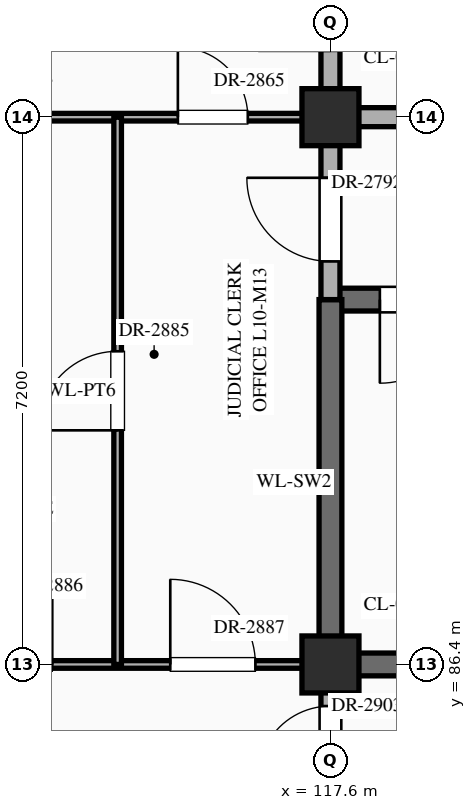
"""IFC4 building model, lengths in metres.
Left out: names, types, materials, properties, quantities, classifications, styles, units other than length and angle.
Written with IfcOpenShell. Run it as: python <this file> out.ifc"""

import sys

from ifc_helpers import new_model, si_unit, direction, frame, frame_2d, origin, origin_2d, place, context, subcontext, project, spatial, rectangle, extrude, element, fill, save


model = new_model("IFC4")
c1 = context("Model", 3, precision=1e-05, world=origin(), true_north=direction((0.0, 1.0)))
c2 = subcontext(c1, "Body", "Model", "MODEL_VIEW")
j1 = project(units=[si_unit("LENGTHUNIT", "METRE"), si_unit("PLANEANGLEUNIT", "RADIAN")], contexts=[c1])
p1 = place(None, origin())
s1 = spatial("IfcSite", under=j1, at=p1, CompositionType="ELEMENT")
p2 = place(p1, origin())
s2 = spatial("IfcBuilding", under=s1, at=p2, CompositionType="ELEMENT")
p3 = place(p2, frame((0.0, 0.0, 43.5)))
s3 = spatial("IfcBuildingStorey", under=s2, at=p3, CompositionType="ELEMENT", Elevation=43.5)
for number, where, z_axis, x_axis in (
    (1, (117.6, 86.4, 0.0), (0.0, 0.0, 1.0), (1.0, 0.0, 0.0)),
    (2, (117.6, 93.6, 0.0), (0.0, 0.0, 1.0), (1.0, 0.0, 0.0)),
):
    element("IfcColumn", number, at=place(p3, frame(where, z_axis=z_axis, x_axis=x_axis)), inside=s3, PredefinedType="COLUMN", context=c2, shape_type="SweptSolid", body=[
        extrude(rectangle(XDim=0.75, YDim=0.75, at=origin_2d()), origin(), (0.0, 0.0, 1.0), 4.2),
    ])
p4 = place(p3, frame((109.2, 86.4, 0.0), z_axis=(0.0, 0.0, 1.0), x_axis=(1.0, 0.0, 0.0)))
e3 = element("IfcWall", 3, at=p4, inside=s3, PredefinedType="STANDARD", context=c2, shape_type="SweptSolid", body=[
    extrude(rectangle(XDim=8.4, YDim=0.1, at=frame_2d((4.2, 0.0))), origin(), (0.0, 0.0, 1.0), 3.1),
])
p5 = place(p4, frame((1.048, 0.0, 0.0)))
e4 = element("IfcOpeningElement", 4, at=p5, cuts=e3, PredefinedType="OPENING", context=c2, shape_type="SweptSolid", body=[
    extrude(rectangle(XDim=1.0, YDim=2.25, at=frame_2d((0.5, 1.125))), frame((0.0, 0.062, 0.0), z_axis=(0.0, -1.0, 0.0), x_axis=(1.0, 0.0, 0.0)), (0.0, 0.0, 1.0), 0.124),
])
p6 = place(p4, frame((3.66, 0.0, 0.0)))
e5 = element("IfcOpeningElement", 5, at=p6, cuts=e3, PredefinedType="OPENING", context=c2, shape_type="SweptSolid", body=[
    extrude(rectangle(XDim=1.08, YDim=2.25, at=frame_2d((0.54, 1.125))), frame((0.0, 0.062, 0.0), z_axis=(0.0, -1.0, 0.0), x_axis=(1.0, 0.0, 0.0)), (0.0, 0.0, 1.0), 0.124),
])
p7 = place(p4, frame((6.292, 0.0, 0.0)))
e6 = element("IfcOpeningElement", 6, at=p7, cuts=e3, PredefinedType="OPENING", context=c2, shape_type="SweptSolid", body=[
    extrude(rectangle(XDim=1.12, YDim=2.25, at=frame_2d((0.56, 1.125))), frame((0.0, 0.062, 0.0), z_axis=(0.0, -1.0, 0.0), x_axis=(1.0, 0.0, 0.0)), (0.0, 0.0, 1.0), 0.124),
])
p8 = place(p3, frame((117.6, 86.4, 0.0), z_axis=(0.0, 0.0, 1.0), x_axis=(1.0, 0.0, 0.0)))
e7 = element("IfcWall", 7, at=p8, inside=s3, PredefinedType="SHEAR", context=c2, shape_type="SweptSolid", body=[
    extrude(rectangle(XDim=8.36, YDim=0.3, at=frame_2d((4.18, 0.0))), origin(), (0.0, 0.0, 1.0), 4.0),
])
p9 = place(p3, frame((117.6, 91.2, 0.0), z_axis=(0.0, 0.0, 1.0), x_axis=(1.0, 0.0, 0.0)))
e8 = element("IfcWall", 8, at=p9, inside=s3, PredefinedType="SHEAR", context=c2, shape_type="SweptSolid", body=[
    extrude(rectangle(XDim=8.36, YDim=0.3, at=frame_2d((4.18, 0.0))), origin(), (0.0, 0.0, 1.0), 4.0),
])
p10 = place(p9, frame((0.65, 0.0, 0.0)))
e9 = element("IfcOpeningElement", 9, at=p10, cuts=e8, PredefinedType="OPENING", context=c2, shape_type="SweptSolid", body=[
    extrude(rectangle(XDim=1.1, YDim=2.2, at=frame_2d((0.55, 1.1))), frame((0.0, 0.162, 0.0), z_axis=(0.0, -1.0, 0.0), x_axis=(1.0, 0.0, 0.0)), (0.0, 0.0, 1.0), 0.324),
])
p11 = place(p3, frame((109.2, 93.6, 0.0), z_axis=(0.0, 0.0, 1.0), x_axis=(1.0, 0.0, 0.0)))
e10 = element("IfcWall", 10, at=p11, inside=s3, PredefinedType="STANDARD", context=c2, shape_type="SweptSolid", body=[
    extrude(rectangle(XDim=8.4, YDim=0.1, at=frame_2d((4.2, 0.0))), origin(), (0.0, 0.0, 1.0), 3.1),
])
p12 = place(p11, frame((1.097, 0.0, 0.0)))
e11 = element("IfcOpeningElement", 11, at=p12, cuts=e10, PredefinedType="OPENING", context=c2, shape_type="SweptSolid", body=[
    extrude(rectangle(XDim=0.9, YDim=2.15, at=frame_2d((0.45, 1.075))), frame((0.0, 0.062, 0.0), z_axis=(0.0, -1.0, 0.0), x_axis=(1.0, 0.0, 0.0)), (0.0, 0.0, 1.0), 0.124),
])
p13 = place(p11, frame((3.77, 0.0, 0.0)))
e12 = element("IfcOpeningElement", 12, at=p13, cuts=e10, PredefinedType="OPENING", context=c2, shape_type="SweptSolid", body=[
    extrude(rectangle(XDim=0.86, YDim=2.1, at=frame_2d((0.43, 1.05))), frame((0.0, 0.062, 0.0), z_axis=(0.0, -1.0, 0.0), x_axis=(1.0, 0.0, 0.0)), (0.0, 0.0, 1.0), 0.124),
])
p14 = place(p11, frame((6.393, 0.0, 0.0)))
e13 = element("IfcOpeningElement", 13, at=p14, cuts=e10, PredefinedType="OPENING", context=c2, shape_type="SweptSolid", body=[
    extrude(rectangle(XDim=0.92, YDim=2.15, at=frame_2d((0.46, 1.075))), frame((0.0, 0.062, 0.0), z_axis=(0.0, -1.0, 0.0), x_axis=(1.0, 0.0, 0.0)), (0.0, 0.0, 1.0), 0.124),
])
p15 = place(p3, frame((117.6, 93.6, 0.0), z_axis=(0.0, 0.0, 1.0), x_axis=(1.0, 0.0, 0.0)))
e14 = element("IfcWall", 14, at=p15, inside=s3, PredefinedType="STANDARD", context=c2, shape_type="SweptSolid", body=[
    extrude(rectangle(XDim=8.36, YDim=0.25, at=frame_2d((4.18, 0.0))), origin(), (0.0, 0.0, 1.0), 3.15),
])
p16 = place(p15, frame((3.3, 0.0, 0.0)))
e15 = element("IfcOpeningElement", 15, at=p16, cuts=e14, PredefinedType="OPENING", context=c2, shape_type="SweptSolid", body=[
    extrude(rectangle(XDim=1.8, YDim=2.35, at=frame_2d((0.9, 1.175))), frame((0.0, 0.137, 0.0), z_axis=(0.0, -1.0, 0.0), x_axis=(1.0, 0.0, 0.0)), (0.0, 0.0, 1.0), 0.274),
])
p17 = place(p3, frame((114.8, 86.4, 0.0), z_axis=(0.0, 0.0, 1.0), x_axis=(0.0, 1.0, 0.0)))
e16 = element("IfcWall", 16, at=p17, inside=s3, PredefinedType="STANDARD", context=c2, shape_type="SweptSolid", body=[
    extrude(rectangle(XDim=7.2, YDim=0.1, at=frame_2d((3.6, 0.0))), origin(), (0.0, 0.0, 1.0), 3.95),
])
p18 = place(p17, frame((3.08, 0.0, 0.0)))
e17 = element("IfcOpeningElement", 17, at=p18, cuts=e16, PredefinedType="OPENING", context=c2, shape_type="SweptSolid", body=[
    extrude(rectangle(XDim=1.04, YDim=2.2, at=frame_2d((0.52, 1.1))), frame((0.0, 0.062, 0.0), z_axis=(0.0, -1.0, 0.0), x_axis=(1.0, 0.0, 0.0)), (0.0, 0.0, 1.0), 0.124),
])
p19 = place(p3, frame((117.6, 79.24, 0.0), z_axis=(0.0, 0.0, 1.0), x_axis=(0.0, 1.0, 0.0)))
e18 = element("IfcWall", 18, at=p19, inside=s3, PredefinedType="STANDARD", context=c2, shape_type="SweptSolid", body=[
    extrude(rectangle(XDim=7.16, YDim=0.25, at=frame_2d((3.58, 0.0))), origin(), (0.0, 0.0, 1.0), 3.2),
])
p20 = place(p19, frame((5.663, 0.0, 0.0)))
e19 = element("IfcOpeningElement", 19, at=p20, cuts=e18, PredefinedType="OPENING", context=c2, shape_type="SweptSolid", body=[
    extrude(rectangle(XDim=0.95, YDim=2.15, at=frame_2d((0.475, 1.075))), frame((0.0, 0.137, 0.0), z_axis=(0.0, -1.0, 0.0), x_axis=(1.0, 0.0, 0.0)), (0.0, 0.0, 1.0), 0.274),
])
p21 = place(p19, frame((2.083, 0.0, 0.0)))
e20 = element("IfcOpeningElement", 20, at=p21, cuts=e18, PredefinedType="OPENING", context=c2, shape_type="SweptSolid", body=[
    extrude(rectangle(XDim=1.5, YDim=2.25, at=frame_2d((0.75, 1.125))), frame((0.0, 0.137, 0.0), z_axis=(0.0, -1.0, 0.0), x_axis=(1.0, 0.0, 0.0)), (0.0, 0.0, 1.0), 0.274),
])
p22 = place(p3, frame((117.6, 86.4, 0.0), z_axis=(0.0, 0.0, 1.0), x_axis=(0.0, 1.0, 0.0)))
e21 = element("IfcWall", 21, at=p22, inside=s3, PredefinedType="SHEAR", context=c2, shape_type="SweptSolid", body=[
    extrude(rectangle(XDim=4.8, YDim=0.3, at=frame_2d((2.4, 0.0))), origin(), (0.0, 0.0, 1.0), 3.95),
])
p23 = place(p3, frame((117.6, 91.2, 0.0), z_axis=(0.0, 0.0, 1.0), x_axis=(0.0, 1.0, 0.0)))
e22 = element("IfcWall", 22, at=p23, inside=s3, PredefinedType="STANDARD", context=c2, shape_type="SweptSolid", body=[
    extrude(rectangle(XDim=13.2, YDim=0.25, at=frame_2d((6.6, 0.0))), origin(), (0.0, 0.0, 1.0), 3.2),
])
p24 = place(p23, frame((0.502, 0.0, 0.0)))
e23 = element("IfcOpeningElement", 23, at=p24, cuts=e22, PredefinedType="OPENING", context=c2, shape_type="SweptSolid", body=[
    extrude(rectangle(XDim=1.1, YDim=2.2, at=frame_2d((0.55, 1.1))), frame((0.0, 0.137, 0.0), z_axis=(0.0, -1.0, 0.0), x_axis=(1.0, 0.0, 0.0)), (0.0, 0.0, 1.0), 0.274),
])
p25 = place(p23, frame((10.472, 0.0, 0.0)))
e24 = element("IfcOpeningElement", 24, at=p25, cuts=e22, PredefinedType="OPENING", context=c2, shape_type="SweptSolid", body=[
    extrude(rectangle(XDim=0.95, YDim=2.15, at=frame_2d((0.475, 1.075))), frame((0.0, 0.137, 0.0), z_axis=(0.0, -1.0, 0.0), x_axis=(1.0, 0.0, 0.0)), (0.0, 0.0, 1.0), 0.274),
])
p26 = place(p23, frame((3.272, 0.0, 0.0)))
e25 = element("IfcOpeningElement", 25, at=p26, cuts=e22, PredefinedType="OPENING", context=c2, shape_type="SweptSolid", body=[
    extrude(rectangle(XDim=0.95, YDim=2.15, at=frame_2d((0.475, 1.075))), frame((0.0, 0.137, 0.0), z_axis=(0.0, -1.0, 0.0), x_axis=(1.0, 0.0, 0.0)), (0.0, 0.0, 1.0), 0.274),
])
p27 = place(p10, frame((1.1, 0.0, 0.0), z_axis=(0.0, 0.0, 1.0), x_axis=(-1.0, 0.0, 0.0)))
e26 = element("IfcDoor", 26, at=p27, inside=s3, OperationType="SINGLE_SWING_RIGHT", PredefinedType="DOOR", context=c2, shape_type="SweptSolid", body=[
    extrude(rectangle(XDim=1.1, YDim=2.2, at=frame_2d((0.55, 1.1))), frame((0.0, 0.025, 0.0), z_axis=(0.0, -1.0, 0.0), x_axis=(1.0, 0.0, 0.0)), (0.0, 0.0, 1.0), 0.05),
])
fill(e9, e26)
p28 = place(p24, origin())
e27 = element("IfcDoor", 27, at=p28, inside=s3, OperationType="SINGLE_SWING_RIGHT", PredefinedType="DOOR", context=c2, shape_type="SweptSolid", body=[
    extrude(rectangle(XDim=1.1, YDim=2.2, at=frame_2d((0.55, 1.1))), frame((0.0, 0.025, 0.0), z_axis=(0.0, -1.0, 0.0), x_axis=(1.0, 0.0, 0.0)), (0.0, 0.0, 1.0), 0.05),
])
fill(e23, e27)
p29 = place(p14, origin())
e28 = element("IfcDoor", 28, at=p29, inside=s3, OperationType="SINGLE_SWING_LEFT", PredefinedType="DOOR", context=c2, shape_type="SweptSolid", body=[
    extrude(rectangle(XDim=0.92, YDim=2.15, at=frame_2d((0.46, 1.075))), frame((0.0, 0.025, 0.0), z_axis=(0.0, -1.0, 0.0), x_axis=(1.0, 0.0, 0.0)), (0.0, 0.0, 1.0), 0.05),
])
fill(e13, e28)
p30 = place(p18, origin())
e29 = element("IfcDoor", 29, at=p30, inside=s3, OperationType="SINGLE_SWING_LEFT", PredefinedType="DOOR", context=c2, shape_type="SweptSolid", body=[
    extrude(rectangle(XDim=1.04, YDim=2.2, at=frame_2d((0.52, 1.1))), frame((0.0, 0.025, 0.0), z_axis=(0.0, -1.0, 0.0), x_axis=(1.0, 0.0, 0.0)), (0.0, 0.0, 1.0), 0.05),
])
fill(e17, e29)
p31 = place(p7, origin())
e30 = element("IfcDoor", 30, at=p31, inside=s3, OperationType="SINGLE_SWING_LEFT", PredefinedType="DOOR", context=c2, shape_type="SweptSolid", body=[
    extrude(rectangle(XDim=1.12, YDim=2.25, at=frame_2d((0.56, 1.125))), frame((0.0, 0.025, 0.0), z_axis=(0.0, -1.0, 0.0), x_axis=(1.0, 0.0, 0.0)), (0.0, 0.0, 1.0), 0.05),
])
fill(e6, e30)
p32 = place(p20, origin())
e31 = element("IfcDoor", 31, at=p32, inside=s3, OperationType="SINGLE_SWING_LEFT", PredefinedType="DOOR", context=c2, shape_type="SweptSolid", body=[
    extrude(rectangle(XDim=0.95, YDim=2.15, at=frame_2d((0.475, 1.075))), frame((0.0, 0.025, 0.0), z_axis=(0.0, -1.0, 0.0), x_axis=(1.0, 0.0, 0.0)), (0.0, 0.0, 1.0), 0.05),
])
fill(e19, e31)
save(model, sys.argv[1])
